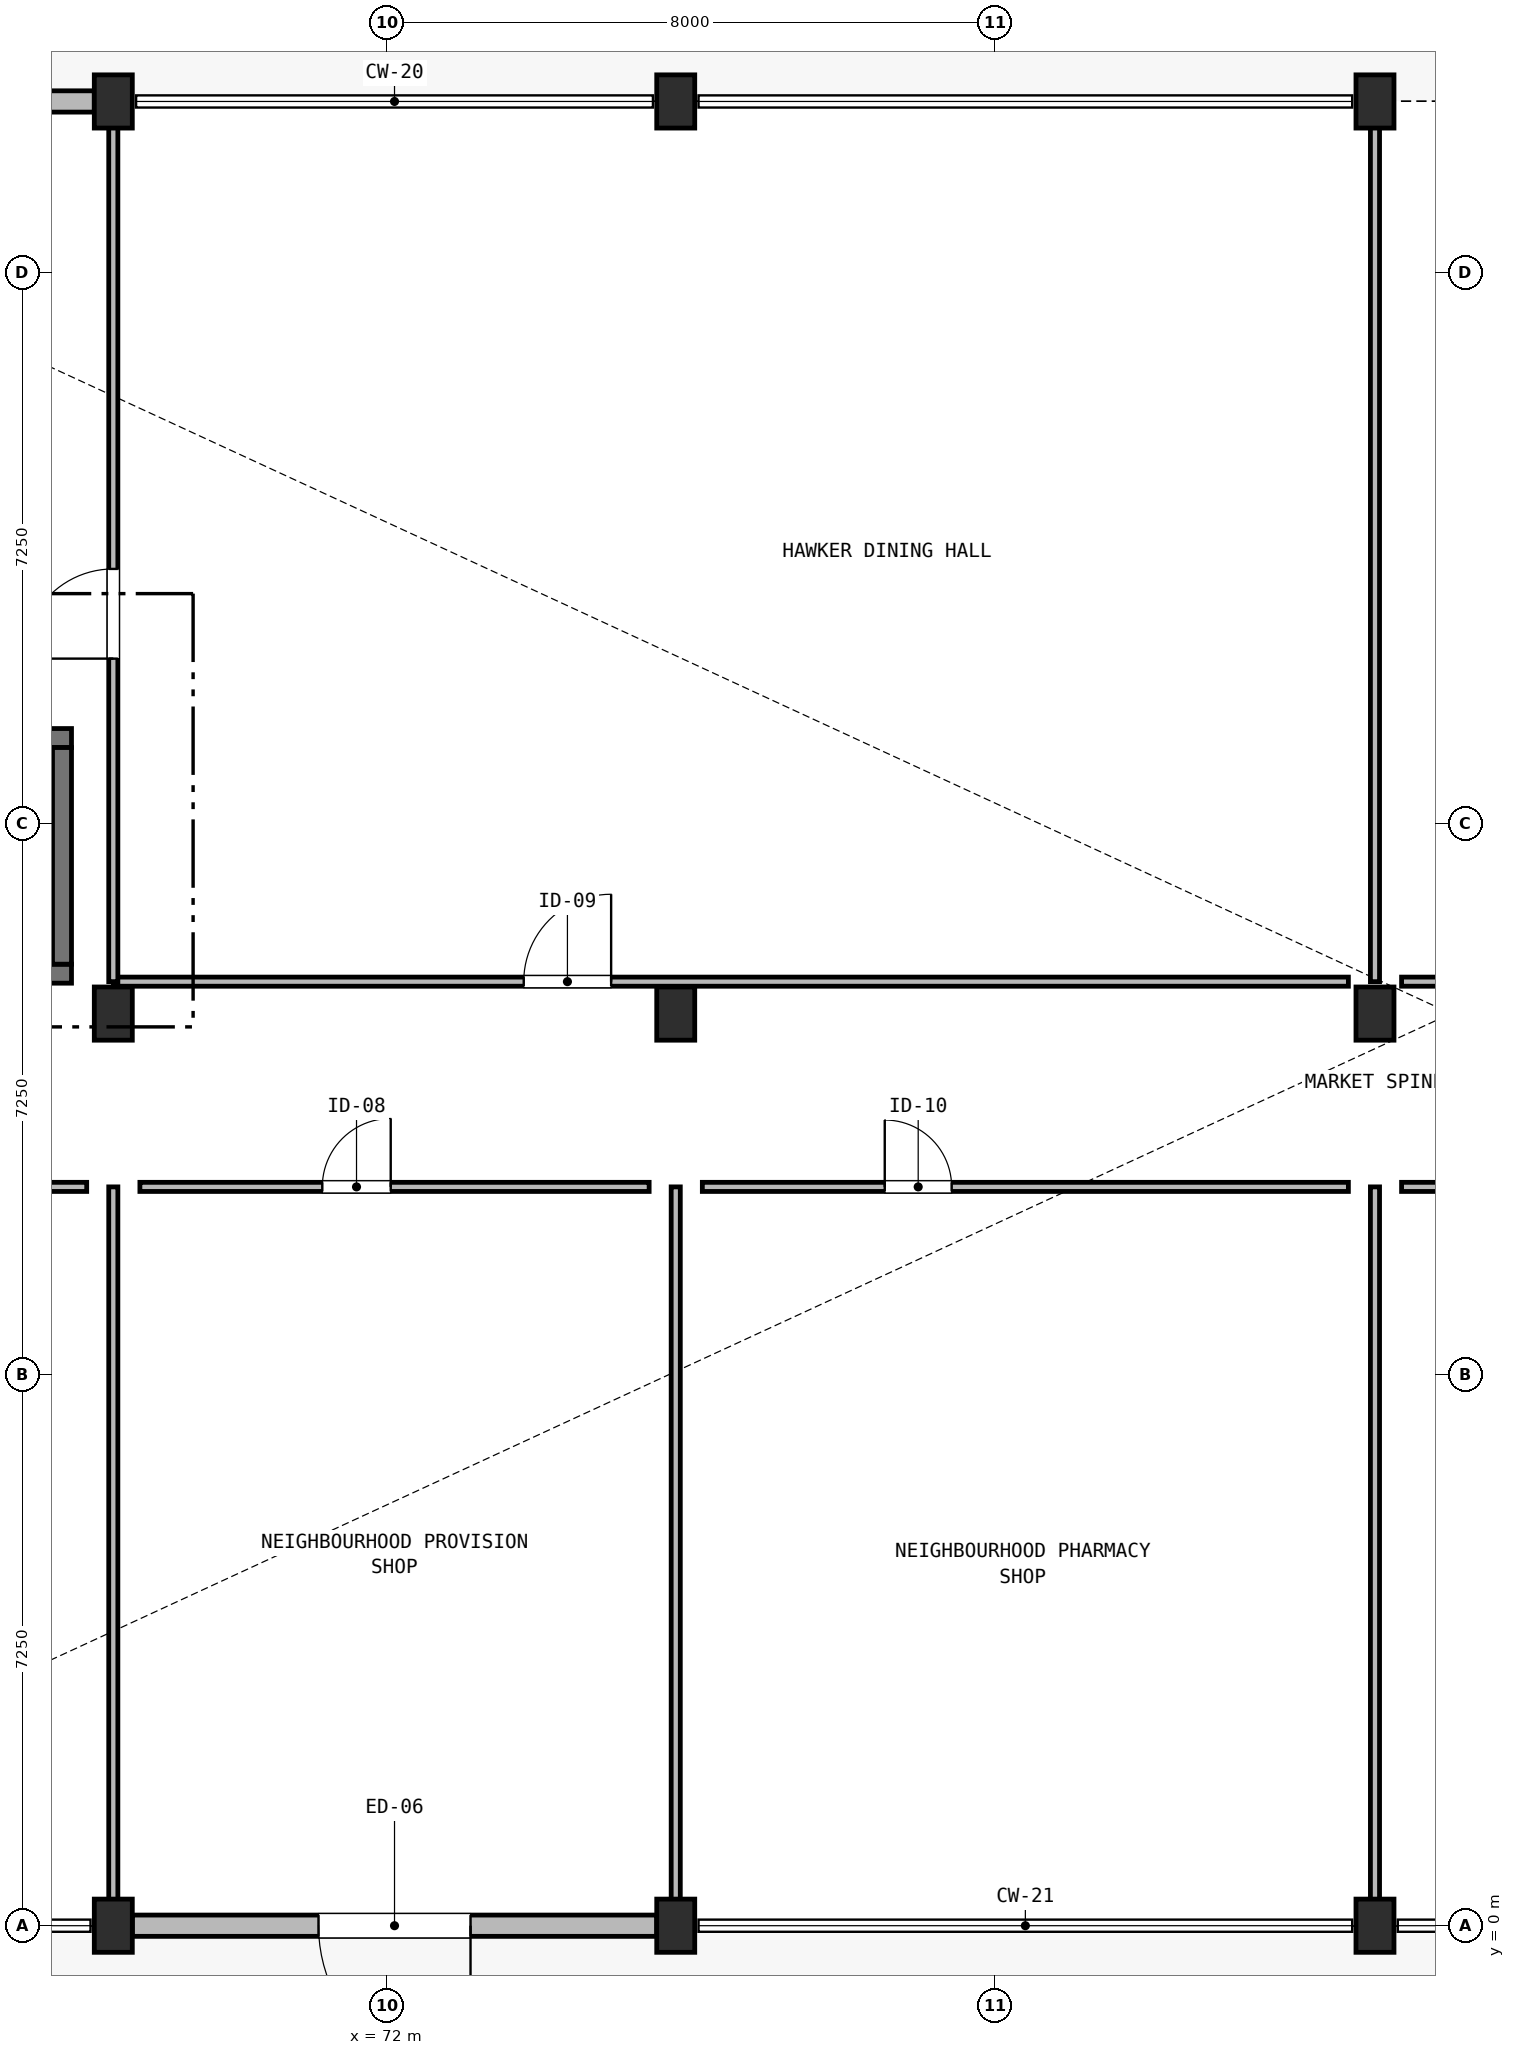
"""IFC4 building model, lengths in metres.
Left out: names, types, materials, properties, quantities, classifications, styles, units other than length and angle.
Written with IfcOpenShell. Run it as: python <this file> out.ifc"""

import sys

from ifc_helpers import new_model, si_unit, direction, frame, frame_2d, origin, origin_2d, place, context, subcontext, project, spatial, rectangle, extrude, element, fill, save


model = new_model("IFC4")
c1 = context("Model", 3, precision=1e-05, world=origin(), true_north=direction((0.0, 1.0)))
c2 = subcontext(c1, "Body", "Model", "MODEL_VIEW")
j1 = project(units=[si_unit("LENGTHUNIT", "METRE"), si_unit("PLANEANGLEUNIT", "RADIAN")], contexts=[c1])
p1 = place(None, origin())
s1 = spatial("IfcSite", under=j1, at=p1, CompositionType="ELEMENT")
p2 = place(p1, origin())
s2 = spatial("IfcBuilding", under=s1, at=p2, CompositionType="ELEMENT")
p3 = place(p2, origin())
s3 = spatial("IfcBuildingStorey", under=s2, at=p3, CompositionType="ELEMENT", Elevation=0.0)
p4 = place(p3, frame((60.55, 12.525, 0.0), z_axis=(0.0, 0.0, 1.0), x_axis=(1.0, 0.0, 0.0)))
e1 = element("IfcWall", 1, at=p4, inside=s3, PredefinedType="SHEAR", context=c2, shape_type="SweptSolid", body=[
    extrude(rectangle(XDim=7.3, YDim=0.25, at=frame_2d((3.65, 0.0))), origin(), (0.0, 0.0, 1.0), 4.5),
])
p5 = place(p4, frame((0.45, 0.0, 0.0)))
e2 = element("IfcOpeningElement", 2, at=p5, cuts=e1, PredefinedType="OPENING", context=c2, shape_type="SweptSolid", body=[
    extrude(rectangle(XDim=1.05, YDim=2.15, at=frame_2d((0.525, 1.075))), frame((0.0, 0.14, 0.0), z_axis=(0.0, -1.0, 0.0), x_axis=(1.0, 0.0, 0.0)), (0.0, 0.0, 1.0), 0.28),
])
p6 = place(p3, frame((60.55, 15.625, 0.0), z_axis=(0.0, 0.0, 1.0), x_axis=(1.0, 0.0, 0.0)))
e3 = element("IfcWall", 3, at=p6, inside=s3, PredefinedType="SHEAR", context=c2, shape_type="SweptSolid", body=[
    extrude(rectangle(XDim=7.3, YDim=0.25, at=frame_2d((3.65, 0.0))), origin(), (0.0, 0.0, 1.0), 4.5),
])
p7 = place(p6, frame((0.45, 0.0, 0.0)))
e4 = element("IfcOpeningElement", 4, at=p7, cuts=e3, PredefinedType="OPENING", context=c2, shape_type="SweptSolid", body=[
    extrude(rectangle(XDim=1.12, YDim=2.15, at=frame_2d((0.56, 1.075))), frame((0.0, 0.14, 0.0), z_axis=(0.0, -1.0, 0.0), x_axis=(1.0, 0.0, 0.0)), (0.0, 0.0, 1.0), 0.28),
])
p8 = place(p3, frame((67.725, 12.65, 0.0), z_axis=(0.0, 0.0, 1.0), x_axis=(0.0, 1.0, 0.0)))
e5 = element("IfcWall", 5, at=p8, inside=s3, PredefinedType="SHEAR", context=c2, shape_type="SweptSolid", body=[
    extrude(rectangle(XDim=2.85, YDim=0.25, at=frame_2d((1.425, 0.0))), origin(), (0.0, 0.0, 1.0), 4.5),
])
for number, where, z_axis, x_axis in (
    (6, (68.4, 0.0, 0.0), (0.0, 0.0, 1.0), (1.0, 0.0, 0.0)),
    (7, (68.4, 12.0, 0.0), (0.0, 0.0, 1.0), (1.0, 0.0, 0.0)),
    (8, (68.4, 24.0, 0.0), (0.0, 0.0, 1.0), (1.0, 0.0, 0.0)),
    (9, (75.8, 0.0, 0.0), (0.0, 0.0, 1.0), (1.0, 0.0, 0.0)),
    (10, (75.8, 12.0, 0.0), (0.0, 0.0, 1.0), (1.0, 0.0, 0.0)),
    (11, (75.8, 24.0, 0.0), (0.0, 0.0, 1.0), (1.0, 0.0, 0.0)),
    (12, (85.0, 0.0, 0.0), (0.0, 0.0, 1.0), (1.0, 0.0, 0.0)),
    (13, (85.0, 12.0, 0.0), (0.0, 0.0, 1.0), (1.0, 0.0, 0.0)),
    (14, (85.0, 24.0, 0.0), (0.0, 0.0, 1.0), (1.0, 0.0, 0.0)),
):
    element("IfcColumn", number, at=place(p3, frame(where, z_axis=z_axis, x_axis=x_axis)), inside=s3, PredefinedType="COLUMN", context=c2, shape_type="SweptSolid", body=[
        extrude(rectangle(XDim=0.5, YDim=0.7, at=origin_2d()), origin(), (0.0, 0.0, 1.0), 4.5),
    ])
p9 = place(p3, frame((60.25, 24.0, 0.0), z_axis=(0.0, 0.0, 1.0), x_axis=(1.0, 0.0, 0.0)))
e15 = element("IfcWall", 15, at=p9, inside=s3, PredefinedType="SOLIDWALL", context=c2, shape_type="SweptSolid", body=[
    extrude(rectangle(XDim=7.9, YDim=0.28, at=frame_2d((3.95, 0.0))), origin(), (0.0, 0.0, 1.0), 3.59),
])
p10 = place(p9, frame((0.7, 0.0, 0.0)))
e16 = element("IfcOpeningElement", 16, at=p10, cuts=e15, PredefinedType="OPENING", context=c2, shape_type="SweptSolid", body=[
    extrude(rectangle(XDim=1.1, YDim=2.15, at=frame_2d((0.55, 1.075))), frame((0.0, 0.155, 0.0), z_axis=(0.0, -1.0, 0.0), x_axis=(1.0, 0.0, 0.0)), (0.0, 0.0, 1.0), 0.31),
])
p11 = place(p3, frame((75.55, 0.0, 0.0), z_axis=(0.0, 0.0, 1.0), x_axis=(-1.0, 0.0, 0.0)))
e17 = element("IfcWall", 17, at=p11, inside=s3, PredefinedType="SOLIDWALL", context=c2, shape_type="SweptSolid", body=[
    extrude(rectangle(XDim=6.9, YDim=0.28, at=frame_2d((3.45, 0.0))), origin(), (0.0, 0.0, 1.0), 3.59),
])
p12 = place(p11, frame((2.45, 0.0, 0.0)))
e18 = element("IfcOpeningElement", 18, at=p12, cuts=e17, PredefinedType="OPENING", context=c2, shape_type="SweptSolid", body=[
    extrude(rectangle(XDim=2.0, YDim=2.45, at=frame_2d((1.0, 1.225))), frame((0.0, 0.155, 0.0), z_axis=(0.0, -1.0, 0.0), x_axis=(1.0, 0.0, 0.0)), (0.0, 0.0, 1.0), 0.31),
])
p13 = place(p3, frame((60.15, 9.72, 0.0), z_axis=(0.0, 0.0, 1.0), x_axis=(1.0, 0.0, 0.0)))
e19 = element("IfcWall", 19, at=p13, inside=s3, PredefinedType="PARTITIONING", context=c2, shape_type="SweptSolid", body=[
    extrude(rectangle(XDim=7.9, YDim=0.12, at=frame_2d((3.95, 0.0))), origin(), (0.0, 0.0, 1.0), 4.23),
])
p14 = place(p13, frame((2.65, 0.0, 0.0)))
e20 = element("IfcOpeningElement", 20, at=p14, cuts=e19, PredefinedType="OPENING", context=c2, shape_type="SweptSolid", body=[
    extrude(rectangle(XDim=0.9, YDim=2.1, at=frame_2d((0.45, 1.05))), frame((0.0, 0.075, 0.0), z_axis=(0.0, -1.0, 0.0), x_axis=(1.0, 0.0, 0.0)), (0.0, 0.0, 1.0), 0.15),
])
p15 = place(p3, frame((68.75, 9.72, 0.0), z_axis=(0.0, 0.0, 1.0), x_axis=(1.0, 0.0, 0.0)))
e21 = element("IfcWall", 21, at=p15, inside=s3, PredefinedType="PARTITIONING", context=c2, shape_type="SweptSolid", body=[
    extrude(rectangle(XDim=6.7, YDim=0.12, at=frame_2d((3.35, 0.0))), origin(), (0.0, 0.0, 1.0), 4.23),
])
p16 = place(p15, frame((2.4, 0.0, 0.0)))
e22 = element("IfcOpeningElement", 22, at=p16, cuts=e21, PredefinedType="OPENING", context=c2, shape_type="SweptSolid", body=[
    extrude(rectangle(XDim=0.9, YDim=2.1, at=frame_2d((0.45, 1.05))), frame((0.0, 0.075, 0.0), z_axis=(0.0, -1.0, 0.0), x_axis=(1.0, 0.0, 0.0)), (0.0, 0.0, 1.0), 0.15),
])
p17 = place(p3, frame((76.15, 9.72, 0.0), z_axis=(0.0, 0.0, 1.0), x_axis=(1.0, 0.0, 0.0)))
e23 = element("IfcWall", 23, at=p17, inside=s3, PredefinedType="PARTITIONING", context=c2, shape_type="SweptSolid", body=[
    extrude(rectangle(XDim=8.5, YDim=0.12, at=frame_2d((4.25, 0.0))), origin(), (0.0, 0.0, 1.0), 4.23),
])
p18 = place(p17, frame((2.4, 0.0, 0.0)))
e24 = element("IfcOpeningElement", 24, at=p18, cuts=e23, PredefinedType="OPENING", context=c2, shape_type="SweptSolid", body=[
    extrude(rectangle(XDim=0.88, YDim=2.1, at=frame_2d((0.44, 1.05))), frame((0.0, 0.075, 0.0), z_axis=(0.0, -1.0, 0.0), x_axis=(1.0, 0.0, 0.0)), (0.0, 0.0, 1.0), 0.15),
])
p19 = place(p3, frame((85.35, 9.72, 0.0), z_axis=(0.0, 0.0, 1.0), x_axis=(1.0, 0.0, 0.0)))
e25 = element("IfcWall", 25, at=p19, inside=s3, PredefinedType="PARTITIONING", context=c2, shape_type="SweptSolid", body=[
    extrude(rectangle(XDim=8.5, YDim=0.12, at=frame_2d((4.25, 0.0))), origin(), (0.0, 0.0, 1.0), 4.23),
])
p20 = place(p19, frame((2.4, 0.0, 0.0)))
e26 = element("IfcOpeningElement", 26, at=p20, cuts=e25, PredefinedType="OPENING", context=c2, shape_type="SweptSolid", body=[
    extrude(rectangle(XDim=0.9, YDim=2.1, at=frame_2d((0.45, 1.05))), frame((0.0, 0.075, 0.0), z_axis=(0.0, -1.0, 0.0), x_axis=(1.0, 0.0, 0.0)), (0.0, 0.0, 1.0), 0.15),
])
for number, where, z_axis, x_axis in (
    (27, (68.4, 0.12, 0.0), (0.0, 0.0, 1.0), (0.0, 1.0, 0.0)),
    (28, (75.8, 0.12, 0.0), (0.0, 0.0, 1.0), (0.0, 1.0, 0.0)),
    (29, (85.0, 0.12, 0.0), (0.0, 0.0, 1.0), (0.0, 1.0, 0.0)),
):
    element("IfcWall", number, at=place(p3, frame(where, z_axis=z_axis, x_axis=x_axis)), inside=s3, PredefinedType="PARTITIONING", context=c2, shape_type="SweptSolid", body=[
        extrude(rectangle(XDim=9.6, YDim=0.12, at=frame_2d((4.8, 0.0))), origin(), (0.0, 0.0, 1.0), 3.6),
    ])
p21 = place(p3, frame((68.4, 12.42, 0.0), z_axis=(0.0, 0.0, 1.0), x_axis=(1.0, 0.0, 0.0)))
e30 = element("IfcWall", 30, at=p21, inside=s3, PredefinedType="PARTITIONING", context=c2, shape_type="SweptSolid", body=[
    extrude(rectangle(XDim=16.25, YDim=0.12, at=frame_2d((8.125, 0.0))), origin(), (0.0, 0.0, 1.0), 4.23),
])
p22 = place(p21, frame((5.4, 0.0, 0.0)))
e31 = element("IfcOpeningElement", 31, at=p22, cuts=e30, PredefinedType="OPENING", context=c2, shape_type="SweptSolid", body=[
    extrude(rectangle(XDim=1.15, YDim=2.15, at=frame_2d((0.575, 1.075))), frame((0.0, 0.075, 0.0), z_axis=(0.0, -1.0, 0.0), x_axis=(1.0, 0.0, 0.0)), (0.0, 0.0, 1.0), 0.15),
])
p23 = place(p3, frame((85.35, 12.42, 0.0), z_axis=(0.0, 0.0, 1.0), x_axis=(1.0, 0.0, 0.0)))
e32 = element("IfcWall", 32, at=p23, inside=s3, PredefinedType="PARTITIONING", context=c2, shape_type="SweptSolid", body=[
    extrude(rectangle(XDim=8.85, YDim=0.12, at=frame_2d((4.425, 0.0))), origin(), (0.0, 0.0, 1.0), 4.23),
])
p24 = place(p23, frame((3.25, 0.0, 0.0)))
e33 = element("IfcOpeningElement", 33, at=p24, cuts=e32, PredefinedType="OPENING", context=c2, shape_type="SweptSolid", body=[
    extrude(rectangle(XDim=0.9, YDim=2.1, at=frame_2d((0.45, 1.05))), frame((0.0, 0.075, 0.0), z_axis=(0.0, -1.0, 0.0), x_axis=(1.0, 0.0, 0.0)), (0.0, 0.0, 1.0), 0.15),
])
p25 = place(p3, frame((68.4, 12.42, 0.0), z_axis=(0.0, 0.0, 1.0), x_axis=(0.0, 1.0, 0.0)))
e34 = element("IfcWall", 34, at=p25, inside=s3, PredefinedType="PARTITIONING", context=c2, shape_type="SweptSolid", body=[
    extrude(rectangle(XDim=11.54, YDim=0.12, at=frame_2d((5.77, 0.0))), origin(), (0.0, 0.0, 1.0), 3.6),
])
p26 = place(p25, frame((4.25, 0.0, 0.0)))
e35 = element("IfcOpeningElement", 35, at=p26, cuts=e34, PredefinedType="OPENING", context=c2, shape_type="SweptSolid", body=[
    extrude(rectangle(XDim=1.18, YDim=2.15, at=frame_2d((0.59, 1.075))), frame((0.0, 0.075, 0.0), z_axis=(0.0, -1.0, 0.0), x_axis=(1.0, 0.0, 0.0)), (0.0, 0.0, 1.0), 0.15),
])
p27 = place(p3, frame((85.0, 12.42, 0.0), z_axis=(0.0, 0.0, 1.0), x_axis=(0.0, 1.0, 0.0)))
e36 = element("IfcWall", 36, at=p27, inside=s3, PredefinedType="PARTITIONING", context=c2, shape_type="SweptSolid", body=[
    extrude(rectangle(XDim=11.54, YDim=0.12, at=frame_2d((5.77, 0.0))), origin(), (0.0, 0.0, 1.0), 3.6),
])
p28 = place(p12, origin())
e37 = element("IfcDoor", 37, at=p28, inside=s3, OperationType="DOUBLE_DOOR_SINGLE_SWING", PredefinedType="DOOR", context=c2, shape_type="SweptSolid", body=[
    extrude(rectangle(XDim=2.0, YDim=2.45, at=frame_2d((1.0, 1.225))), frame((0.0, 0.025, 0.0), z_axis=(0.0, -1.0, 0.0), x_axis=(1.0, 0.0, 0.0)), (0.0, 0.0, 1.0), 0.05),
])
fill(e18, e37)
p29 = place(p16, origin())
e38 = element("IfcDoor", 38, at=p29, inside=s3, OperationType="SINGLE_SWING_RIGHT", PredefinedType="DOOR", context=c2, shape_type="SweptSolid", body=[
    extrude(rectangle(XDim=0.9, YDim=2.1, at=frame_2d((0.45, 1.05))), frame((0.0, 0.025, 0.0), z_axis=(0.0, -1.0, 0.0), x_axis=(1.0, 0.0, 0.0)), (0.0, 0.0, 1.0), 0.05),
])
fill(e22, e38)
p30 = place(p18, origin())
e39 = element("IfcDoor", 39, at=p30, inside=s3, OperationType="SINGLE_SWING_LEFT", PredefinedType="DOOR", context=c2, shape_type="SweptSolid", body=[
    extrude(rectangle(XDim=0.88, YDim=2.1, at=frame_2d((0.44, 1.05))), frame((0.0, 0.025, 0.0), z_axis=(0.0, -1.0, 0.0), x_axis=(1.0, 0.0, 0.0)), (0.0, 0.0, 1.0), 0.05),
])
fill(e24, e39)
p31 = place(p22, origin())
e40 = element("IfcDoor", 40, at=p31, inside=s3, OperationType="SINGLE_SWING_RIGHT", PredefinedType="DOOR", context=c2, shape_type="SweptSolid", body=[
    extrude(rectangle(XDim=1.15, YDim=2.15, at=frame_2d((0.575, 1.075))), frame((0.0, 0.025, 0.0), z_axis=(0.0, -1.0, 0.0), x_axis=(1.0, 0.0, 0.0)), (0.0, 0.0, 1.0), 0.05),
])
fill(e31, e40)
p32 = place(p26, origin())
e41 = element("IfcDoor", 41, at=p32, inside=s3, OperationType="SINGLE_SWING_LEFT", PredefinedType="DOOR", context=c2, shape_type="SweptSolid", body=[
    extrude(rectangle(XDim=1.18, YDim=2.15, at=frame_2d((0.59, 1.075))), frame((0.0, 0.025, 0.0), z_axis=(0.0, -1.0, 0.0), x_axis=(1.0, 0.0, 0.0)), (0.0, 0.0, 1.0), 0.05),
])
fill(e35, e41)
save(model, sys.argv[1])
